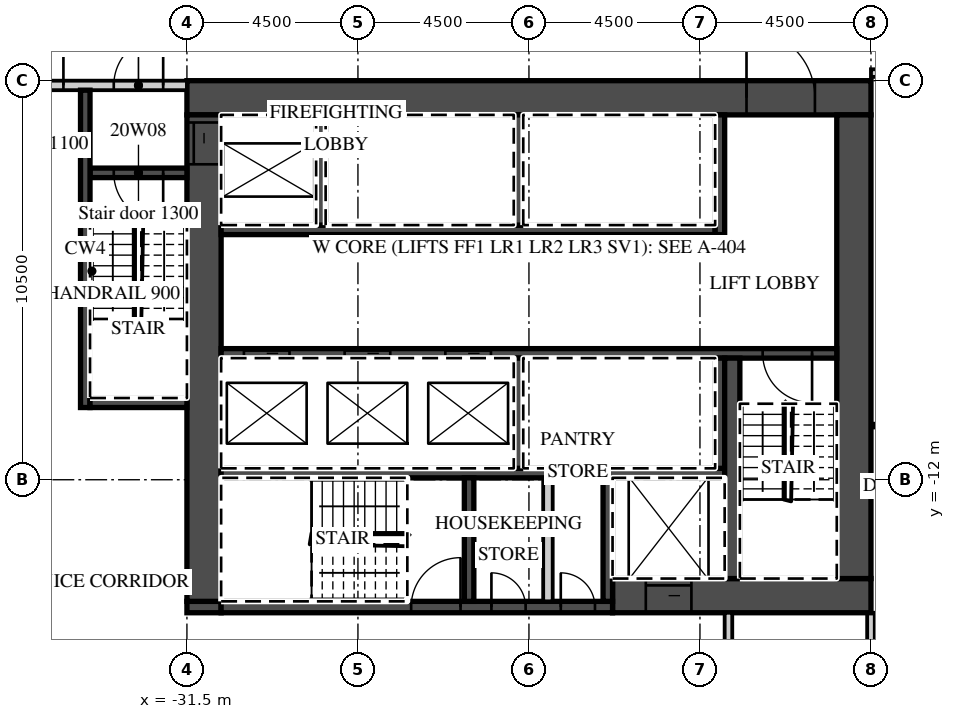
"""IFC4 building model, lengths in metres.
Left out: names, types, materials, properties, quantities, classifications, styles, units other than length and angle.
Written with IfcOpenShell. Run it as: python <this file> out.ifc"""

import sys

from ifc_helpers import new_model, si_unit, direction, frame, frame_2d, origin, place, context, subcontext, project, spatial, rectangle, extrude, element, fill, save


model = new_model("IFC4")
c1 = context("Model", 3, precision=1e-05, world=origin(), true_north=direction((0.0, 1.0)))
c2 = subcontext(c1, "Body", "Model", "MODEL_VIEW")
j1 = project(units=[si_unit("LENGTHUNIT", "METRE"), si_unit("PLANEANGLEUNIT", "RADIAN")], contexts=[c1])
p1 = place(None, origin())
s1 = spatial("IfcSite", under=j1, at=p1, CompositionType="ELEMENT")
p2 = place(p1, origin())
s2 = spatial("IfcBuilding", under=s1, at=p2, CompositionType="ELEMENT")
p3 = place(p2, frame((0.0, 0.0, 96.3)))
s3 = spatial("IfcBuildingStorey", under=s2, at=p3, CompositionType="ELEMENT", Elevation=96.3)
p4 = place(p3, frame((-13.5, -21.55, 0.0), z_axis=(0.0, 0.0, 1.0), x_axis=(0.0, 1.0, 0.0)))
e1 = element("IfcWall", 1, at=p4, inside=s3, PredefinedType="PARTITIONING", context=c2, shape_type="SweptSolid", body=[
    extrude(rectangle(XDim=6.05, YDim=0.2, at=frame_2d((3.025, 0.0))), origin(), (0.0, 0.0, 1.0), 3.0),
])
p5 = place(p3, frame((-13.5, -1.3, 0.0), z_axis=(0.0, 0.0, 1.0), x_axis=(1.0, 0.0, 0.0)))
e2 = element("IfcWall", 2, at=p5, inside=s3, PredefinedType="PARTITIONING", context=c2, shape_type="SweptSolid", body=[
    extrude(rectangle(XDim=58.05, YDim=0.2, at=frame_2d((29.025, 0.0))), origin(), (0.0, 0.0, 1.0), 3.0),
])
p6 = place(p5, frame((0.575, 0.0, 0.0)))
e3 = element("IfcOpeningElement", 3, at=p6, cuts=e2, PredefinedType="OPENING", context=c2, shape_type="SweptSolid", body=[
    extrude(rectangle(XDim=1.0, YDim=2.1, at=frame_2d((0.5, 1.05))), frame((0.0, 0.11, 0.0), z_axis=(0.0, -1.0, 0.0), x_axis=(1.0, 0.0, 0.0)), (0.0, 0.0, 1.0), 0.22),
])
p7 = place(p5, frame((7.45, 0.0, 0.0)))
e4 = element("IfcOpeningElement", 4, at=p7, cuts=e2, PredefinedType="OPENING", context=c2, shape_type="SweptSolid", body=[
    extrude(rectangle(XDim=1.0, YDim=2.1, at=frame_2d((0.5, 1.05))), frame((0.0, 0.11, 0.0), z_axis=(0.0, -1.0, 0.0), x_axis=(1.0, 0.0, 0.0)), (0.0, 0.0, 1.0), 0.22),
])
p8 = place(p5, frame((11.925, 0.0, 0.0)))
e5 = element("IfcOpeningElement", 5, at=p8, cuts=e2, PredefinedType="OPENING", context=c2, shape_type="SweptSolid", body=[
    extrude(rectangle(XDim=1.0, YDim=2.1, at=frame_2d((0.5, 1.05))), frame((0.0, 0.11, 0.0), z_axis=(0.0, -1.0, 0.0), x_axis=(1.0, 0.0, 0.0)), (0.0, 0.0, 1.0), 0.22),
])
p9 = place(p5, frame((14.075, 0.0, 0.0)))
e6 = element("IfcOpeningElement", 6, at=p9, cuts=e2, PredefinedType="OPENING", context=c2, shape_type="SweptSolid", body=[
    extrude(rectangle(XDim=1.0, YDim=2.1, at=frame_2d((0.5, 1.05))), frame((0.0, 0.11, 0.0), z_axis=(0.0, -1.0, 0.0), x_axis=(1.0, 0.0, 0.0)), (0.0, 0.0, 1.0), 0.22),
])
p10 = place(p5, frame((20.925, 0.0, 0.0)))
e7 = element("IfcOpeningElement", 7, at=p10, cuts=e2, PredefinedType="OPENING", context=c2, shape_type="SweptSolid", body=[
    extrude(rectangle(XDim=1.0, YDim=2.1, at=frame_2d((0.5, 1.05))), frame((0.0, 0.11, 0.0), z_axis=(0.0, -1.0, 0.0), x_axis=(1.0, 0.0, 0.0)), (0.0, 0.0, 1.0), 0.22),
])
p11 = place(p5, frame((27.862, 0.0, 0.0)))
e8 = element("IfcOpeningElement", 8, at=p11, cuts=e2, PredefinedType="OPENING", context=c2, shape_type="SweptSolid", body=[
    extrude(rectangle(XDim=1.2, YDim=2.1, at=frame_2d((0.6, 1.05))), frame((0.0, 0.11, 0.0), z_axis=(0.0, -1.0, 0.0), x_axis=(1.0, 0.0, 0.0)), (0.0, 0.0, 1.0), 0.22),
])
p12 = place(p5, frame((33.938, 0.0, 0.0)))
e9 = element("IfcOpeningElement", 9, at=p12, cuts=e2, PredefinedType="OPENING", context=c2, shape_type="SweptSolid", body=[
    extrude(rectangle(XDim=1.2, YDim=2.1, at=frame_2d((0.6, 1.05))), frame((0.0, 0.11, 0.0), z_axis=(0.0, -1.0, 0.0), x_axis=(1.0, 0.0, 0.0)), (0.0, 0.0, 1.0), 0.22),
])
p13 = place(p5, frame((45.862, 0.0, 0.0)))
e10 = element("IfcOpeningElement", 10, at=p13, cuts=e2, PredefinedType="OPENING", context=c2, shape_type="SweptSolid", body=[
    extrude(rectangle(XDim=1.2, YDim=2.1, at=frame_2d((0.6, 1.05))), frame((0.0, 0.11, 0.0), z_axis=(0.0, -1.0, 0.0), x_axis=(1.0, 0.0, 0.0)), (0.0, 0.0, 1.0), 0.22),
])
p14 = place(p5, frame((52.425, 0.0, 0.0)))
e11 = element("IfcOpeningElement", 11, at=p14, cuts=e2, PredefinedType="OPENING", context=c2, shape_type="SweptSolid", body=[
    extrude(rectangle(XDim=1.0, YDim=2.1, at=frame_2d((0.5, 1.05))), frame((0.0, 0.11, 0.0), z_axis=(0.0, -1.0, 0.0), x_axis=(1.0, 0.0, 0.0)), (0.0, 0.0, 1.0), 0.22),
])
p15 = place(p5, frame((56.525, 0.0, 0.0)))
e12 = element("IfcOpeningElement", 12, at=p15, cuts=e2, PredefinedType="OPENING", context=c2, shape_type="SweptSolid", body=[
    extrude(rectangle(XDim=1.0, YDim=2.1, at=frame_2d((0.5, 1.05))), frame((0.0, 0.11, 0.0), z_axis=(0.0, -1.0, 0.0), x_axis=(1.0, 0.0, 0.0)), (0.0, 0.0, 1.0), 0.22),
])
p16 = place(p3, frame((-31.5, -1.95, 0.0), z_axis=(0.0, 0.0, 1.0), x_axis=(1.0, 0.0, 0.0)))
e13 = element("IfcWall", 13, at=p16, inside=s3, PredefinedType="SHEAR", context=c2, shape_type="SweptSolid", body=[
    extrude(rectangle(XDim=18.0, YDim=0.9, at=frame_2d((9.0, 0.0))), origin(), (0.0, 0.0, 1.0), 3.0),
])
p17 = place(p16, frame((14.725, 0.0, 0.0)))
e14 = element("IfcOpeningElement", 14, at=p17, cuts=e13, PredefinedType="OPENING", context=c2, shape_type="SweptSolid", body=[
    extrude(rectangle(XDim=1.8, YDim=2.1, at=frame_2d((0.9, 1.05))), frame((0.0, 0.46, 0.0), z_axis=(0.0, -1.0, 0.0), x_axis=(1.0, 0.0, 0.0)), (0.0, 0.0, 1.0), 0.92),
])
p18 = place(p3, frame((-20.3, -15.05, 0.0), z_axis=(0.0, 0.0, 1.0), x_axis=(1.0, 0.0, 0.0)))
e15 = element("IfcWall", 15, at=p18, inside=s3, PredefinedType="SHEAR", context=c2, shape_type="SweptSolid", body=[
    extrude(rectangle(XDim=6.8, YDim=0.9, at=frame_2d((3.4, 0.0))), origin(), (0.0, 0.0, 1.0), 3.0),
])
p19 = place(p18, frame((0.875, 0.0, 0.0)))
e16 = element("IfcOpeningElement", 16, at=p19, cuts=e15, PredefinedType="OPENING", context=c2, shape_type="SweptSolid", body=[
    extrude(rectangle(XDim=1.2, YDim=2.1, at=frame_2d((0.6, 1.05))), frame((0.0, 0.46, 0.0), z_axis=(0.0, -1.0, 0.0), x_axis=(1.0, 0.0, 0.0)), (0.0, 0.0, 1.0), 0.92),
])
p20 = place(p3, frame((-31.5, -15.35, 0.0), z_axis=(0.0, 0.0, 1.0), x_axis=(1.0, 0.0, 0.0)))
e17 = element("IfcWall", 17, at=p20, inside=s3, PredefinedType="SHEAR", context=c2, shape_type="SweptSolid", body=[
    extrude(rectangle(XDim=0.9, YDim=0.3, at=frame_2d((0.45, 0.0))), origin(), (0.0, 0.0, 1.0), 3.0),
])
p21 = place(p3, frame((-30.6, -15.35, 0.0), z_axis=(0.0, 0.0, 1.0), x_axis=(1.0, 0.0, 0.0)))
e18 = element("IfcWall", 18, at=p21, inside=s3, PredefinedType="SHEAR", context=c2, shape_type="SweptSolid", body=[
    extrude(rectangle(XDim=10.3, YDim=0.3, at=frame_2d((5.15, 0.0))), origin(), (0.0, 0.0, 1.0), 3.0),
])
p22 = place(p21, frame((5.0, 0.0, 0.0)))
e19 = element("IfcOpeningElement", 19, at=p22, cuts=e18, PredefinedType="OPENING", context=c2, shape_type="SweptSolid", body=[
    extrude(rectangle(XDim=1.3, YDim=2.1, at=frame_2d((0.65, 1.05))), frame((0.0, 0.16, 0.0), z_axis=(0.0, -1.0, 0.0), x_axis=(1.0, 0.0, 0.0)), (0.0, 0.0, 1.0), 0.32),
])
p23 = place(p21, frame((7.113, 0.0, 0.0)))
e20 = element("IfcOpeningElement", 20, at=p23, cuts=e18, PredefinedType="OPENING", context=c2, shape_type="SweptSolid", body=[
    extrude(rectangle(XDim=0.9, YDim=2.1, at=frame_2d((0.45, 1.05))), frame((0.0, 0.16, 0.0), z_axis=(0.0, -1.0, 0.0), x_axis=(1.0, 0.0, 0.0)), (0.0, 0.0, 1.0), 0.32),
])
p24 = place(p21, frame((8.938, 0.0, 0.0)))
e21 = element("IfcOpeningElement", 21, at=p24, cuts=e18, PredefinedType="OPENING", context=c2, shape_type="SweptSolid", body=[
    extrude(rectangle(XDim=0.9, YDim=2.1, at=frame_2d((0.45, 1.05))), frame((0.0, 0.16, 0.0), z_axis=(0.0, -1.0, 0.0), x_axis=(1.0, 0.0, 0.0)), (0.0, 0.0, 1.0), 0.32),
])
p25 = place(p3, frame((-31.05, -15.2, 0.0), z_axis=(0.0, 0.0, 1.0), x_axis=(0.0, 1.0, 0.0)))
e22 = element("IfcWall", 22, at=p25, inside=s3, PredefinedType="SHEAR", context=c2, shape_type="SweptSolid", body=[
    extrude(rectangle(XDim=12.8, YDim=0.9, at=frame_2d((6.4, 0.0))), origin(), (0.0, 0.0, 1.0), 3.0),
])
p26 = place(p25, frame((11.5, 0.0, 0.0)))
e23 = element("IfcOpeningElement", 23, at=p26, cuts=e22, PredefinedType="OPENING", context=c2, shape_type="SweptSolid", body=[
    extrude(rectangle(XDim=1.1, YDim=2.1, at=frame_2d((0.55, 1.05))), frame((0.0, 0.46, 0.0), z_axis=(0.0, -1.0, 0.0), x_axis=(1.0, 0.0, 0.0)), (0.0, 0.0, 1.0), 0.92),
])
p27 = place(p3, frame((-13.95, -14.6, 0.0), z_axis=(0.0, 0.0, 1.0), x_axis=(0.0, 1.0, 0.0)))
e24 = element("IfcWall", 24, at=p27, inside=s3, PredefinedType="SHEAR", context=c2, shape_type="SweptSolid", body=[
    extrude(rectangle(XDim=12.2, YDim=0.9, at=frame_2d((6.1, 0.0))), origin(), (0.0, 0.0, 1.0), 3.0),
])
p28 = place(p3, frame((-30.6, -5.425, 0.0), z_axis=(0.0, 0.0, 1.0), x_axis=(1.0, 0.0, 0.0)))
e25 = element("IfcWall", 25, at=p28, inside=s3, PredefinedType="SHEAR", context=c2, shape_type="SweptSolid", body=[
    extrude(rectangle(XDim=13.0, YDim=0.25, at=frame_2d((6.5, 0.0))), origin(), (0.0, 0.0, 1.0), 3.0),
])
p29 = place(p3, frame((-17.475, -5.55, 0.0), z_axis=(0.0, 0.0, 1.0), x_axis=(0.0, 1.0, 0.0)))
e26 = element("IfcWall", 26, at=p29, inside=s3, PredefinedType="SHEAR", context=c2, shape_type="SweptSolid", body=[
    extrude(rectangle(XDim=3.15, YDim=0.25, at=frame_2d((1.575, 0.0))), origin(), (0.0, 0.0, 1.0), 3.0),
])
for number, where, z_axis, x_axis in (
    (27, (-27.975, -5.3, 0.0), (0.0, 0.0, 1.0), (0.0, 1.0, 0.0)),
    (28, (-22.775, -5.3, 0.0), (0.0, 0.0, 1.0), (0.0, 1.0, 0.0)),
):
    element("IfcWall", number, at=place(p3, frame(where, z_axis=z_axis, x_axis=x_axis)), inside=s3, PredefinedType="SHEAR", context=c2, shape_type="SweptSolid", body=[
        extrude(rectangle(XDim=2.9, YDim=0.25, at=frame_2d((1.45, 0.0))), origin(), (0.0, 0.0, 1.0), 3.0),
    ])
p30 = place(p3, frame((-30.6, -8.675, 0.0), z_axis=(0.0, 0.0, 1.0), x_axis=(1.0, 0.0, 0.0)))
e29 = element("IfcWall", 29, at=p30, inside=s3, PredefinedType="SHEAR", context=c2, shape_type="SweptSolid", body=[
    extrude(rectangle(XDim=16.2, YDim=0.25, at=frame_2d((8.1, 0.0))), origin(), (0.0, 0.0, 1.0), 3.0),
])
p31 = place(p30, frame((0.6, 0.0, 0.0)))
e30 = element("IfcOpeningElement", 30, at=p31, cuts=e29, PredefinedType="OPENING", context=c2, shape_type="SweptSolid", body=[
    extrude(rectangle(XDim=1.2, YDim=2.1, at=frame_2d((0.6, 1.05))), frame((0.0, 0.135, 0.0), z_axis=(0.0, -1.0, 0.0), x_axis=(1.0, 0.0, 0.0)), (0.0, 0.0, 1.0), 0.27),
])
p32 = place(p30, frame((3.25, 0.0, 0.0)))
e31 = element("IfcOpeningElement", 31, at=p32, cuts=e29, PredefinedType="OPENING", context=c2, shape_type="SweptSolid", body=[
    extrude(rectangle(XDim=1.2, YDim=2.1, at=frame_2d((0.6, 1.05))), frame((0.0, 0.135, 0.0), z_axis=(0.0, -1.0, 0.0), x_axis=(1.0, 0.0, 0.0)), (0.0, 0.0, 1.0), 0.27),
])
p33 = place(p30, frame((5.9, 0.0, 0.0)))
e32 = element("IfcOpeningElement", 32, at=p33, cuts=e29, PredefinedType="OPENING", context=c2, shape_type="SweptSolid", body=[
    extrude(rectangle(XDim=1.2, YDim=2.1, at=frame_2d((0.6, 1.05))), frame((0.0, 0.135, 0.0), z_axis=(0.0, -1.0, 0.0), x_axis=(1.0, 0.0, 0.0)), (0.0, 0.0, 1.0), 0.27),
])
p34 = place(p30, frame((14.25, 0.0, 0.0)))
e33 = element("IfcOpeningElement", 33, at=p34, cuts=e29, PredefinedType="OPENING", context=c2, shape_type="SweptSolid", body=[
    extrude(rectangle(XDim=1.3, YDim=2.1, at=frame_2d((0.65, 1.05))), frame((0.0, 0.135, 0.0), z_axis=(0.0, -1.0, 0.0), x_axis=(1.0, 0.0, 0.0)), (0.0, 0.0, 1.0), 0.27),
])
p35 = place(p3, frame((-30.6, -11.825, 0.0), z_axis=(0.0, 0.0, 1.0), x_axis=(1.0, 0.0, 0.0)))
e34 = element("IfcWall", 34, at=p35, inside=s3, PredefinedType="SHEAR", context=c2, shape_type="SweptSolid", body=[
    extrude(rectangle(XDim=13.25, YDim=0.25, at=frame_2d((6.625, 0.0))), origin(), (0.0, 0.0, 1.0), 3.0),
])
for number, where, z_axis, x_axis in (
    (35, (-17.475, -11.7, 0.0), (0.0, 0.0, 1.0), (0.0, 1.0, 0.0)),
    (36, (-22.775, -11.7, 0.0), (0.0, 0.0, 1.0), (0.0, 1.0, 0.0)),
):
    element("IfcWall", number, at=place(p3, frame(where, z_axis=z_axis, x_axis=x_axis)), inside=s3, PredefinedType="SHEAR", context=c2, shape_type="SweptSolid", body=[
        extrude(rectangle(XDim=2.9, YDim=0.25, at=frame_2d((1.45, 0.0))), origin(), (0.0, 0.0, 1.0), 3.0),
    ])
p36 = place(p3, frame((-17.15, -14.6, 0.0), z_axis=(0.0, 0.0, 1.0), x_axis=(0.0, 1.0, 0.0)))
e37 = element("IfcWall", 37, at=p36, inside=s3, PredefinedType="SHEAR", context=c2, shape_type="SweptSolid", body=[
    extrude(rectangle(XDim=5.8, YDim=0.4, at=frame_2d((2.9, 0.0))), origin(), (0.0, 0.0, 1.0), 3.0),
])
for number, where, z_axis, x_axis in (
    (38, (-20.425, -15.2, 0.0), (0.0, 0.0, 1.0), (0.0, 1.0, 0.0)),
    (39, (-24.075, -15.2, 0.0), (0.0, 0.0, 1.0), (0.0, 1.0, 0.0)),
):
    element("IfcWall", number, at=place(p3, frame(where, z_axis=z_axis, x_axis=x_axis)), inside=s3, PredefinedType="SHEAR", context=c2, shape_type="SweptSolid", body=[
        extrude(rectangle(XDim=3.25, YDim=0.25, at=frame_2d((1.625, 0.0))), origin(), (0.0, 0.0, 1.0), 3.0),
    ])
p37 = place(p3, frame((-22.0, -15.2, 0.0), z_axis=(0.0, 0.0, 1.0), x_axis=(0.0, 1.0, 0.0)))
e40 = element("IfcWall", 40, at=p37, inside=s3, PredefinedType="PARTITIONING", context=c2, shape_type="SweptSolid", body=[
    extrude(rectangle(XDim=3.25, YDim=0.25, at=frame_2d((1.625, 0.0))), origin(), (0.0, 0.0, 1.0), 3.0),
])
p38 = place(p3, frame((-44.55, -1.625, 0.0), z_axis=(0.0, 0.0, 1.0), x_axis=(1.0, 0.0, 0.0)))
e41 = element("IfcWall", 41, at=p38, inside=s3, PredefinedType="PARTITIONING", context=c2, shape_type="SweptSolid", body=[
    extrude(rectangle(XDim=13.05, YDim=0.25, at=frame_2d((6.525, 0.0))), origin(), (0.0, 0.0, 1.0), 3.0),
])
p39 = place(p38, frame((11.125, 0.0, 0.0)))
e42 = element("IfcOpeningElement", 42, at=p39, cuts=e41, PredefinedType="OPENING", context=c2, shape_type="SweptSolid", body=[
    extrude(rectangle(XDim=1.3, YDim=2.1, at=frame_2d((0.65, 1.05))), frame((0.0, 0.135, 0.0), z_axis=(0.0, -1.0, 0.0), x_axis=(1.0, 0.0, 0.0)), (0.0, 0.0, 1.0), 0.27),
])
p40 = place(p38, frame((8.7, 0.0, 0.0)))
e43 = element("IfcOpeningElement", 43, at=p40, cuts=e41, PredefinedType="OPENING", context=c2, shape_type="SweptSolid", body=[
    extrude(rectangle(XDim=1.1, YDim=2.1, at=frame_2d((0.55, 1.05))), frame((0.0, 0.135, 0.0), z_axis=(0.0, -1.0, 0.0), x_axis=(1.0, 0.0, 0.0)), (0.0, 0.0, 1.0), 0.27),
])
p41 = place(p3, frame((-34.05, -3.925, 0.0), z_axis=(0.0, 0.0, 1.0), x_axis=(1.0, 0.0, 0.0)))
e44 = element("IfcWall", 44, at=p41, inside=s3, PredefinedType="SHEAR", context=c2, shape_type="SweptSolid", body=[
    extrude(rectangle(XDim=2.55, YDim=0.25, at=frame_2d((1.275, 0.0))), origin(), (0.0, 0.0, 1.0), 3.0),
])
p42 = place(p41, frame((0.625, 0.0, 0.0)))
e45 = element("IfcOpeningElement", 45, at=p42, cuts=e44, PredefinedType="OPENING", context=c2, shape_type="SweptSolid", body=[
    extrude(rectangle(XDim=1.3, YDim=2.1, at=frame_2d((0.65, 1.05))), frame((0.0, 0.135, 0.0), z_axis=(0.0, -1.0, 0.0), x_axis=(1.0, 0.0, 0.0)), (0.0, 0.0, 1.0), 0.27),
])
p43 = place(p3, frame((-34.175, -10.1, 0.0), z_axis=(0.0, 0.0, 1.0), x_axis=(0.0, 1.0, 0.0)))
e46 = element("IfcWall", 46, at=p43, inside=s3, PredefinedType="SHEAR", context=c2, shape_type="SweptSolid", body=[
    extrude(rectangle(XDim=8.35, YDim=0.25, at=frame_2d((4.175, 0.0))), origin(), (0.0, 0.0, 1.0), 3.0),
])
p44 = place(p3, frame((-34.05, -9.975, 0.0), z_axis=(0.0, 0.0, 1.0), x_axis=(1.0, 0.0, 0.0)))
e47 = element("IfcWall", 47, at=p44, inside=s3, PredefinedType="SHEAR", context=c2, shape_type="SweptSolid", body=[
    extrude(rectangle(XDim=2.55, YDim=0.25, at=frame_2d((1.275, 0.0))), origin(), (0.0, 0.0, 1.0), 3.0),
])
p45 = place(p3, frame((-17.25, -17.7, 0.0), z_axis=(0.0, 0.0, 1.0), x_axis=(0.0, 1.0, 0.0)))
e48 = element("IfcWall", 48, at=p45, inside=s3, PredefinedType="PARTITIONING", context=c2, shape_type="SweptSolid", body=[
    extrude(rectangle(XDim=2.2, YDim=0.2, at=frame_2d((1.1, 0.0))), origin(), (0.0, 0.0, 1.0), 3.0),
])
p46 = place(p31, origin())
e49 = element("IfcDoor", 49, at=p46, inside=s3, OperationType="SLIDING_TO_LEFT", PredefinedType="DOOR", context=c2, shape_type="SweptSolid", body=[
    extrude(rectangle(XDim=1.2, YDim=2.1, at=frame_2d((0.6, 1.05))), frame((0.0, 0.025, 0.0), z_axis=(0.0, -1.0, 0.0), x_axis=(1.0, 0.0, 0.0)), (0.0, 0.0, 1.0), 0.05),
])
fill(e30, e49)
p47 = place(p32, origin())
e50 = element("IfcDoor", 50, at=p47, inside=s3, OperationType="SLIDING_TO_RIGHT", PredefinedType="DOOR", context=c2, shape_type="SweptSolid", body=[
    extrude(rectangle(XDim=1.2, YDim=2.1, at=frame_2d((0.6, 1.05))), frame((0.0, 0.025, 0.0), z_axis=(0.0, -1.0, 0.0), x_axis=(1.0, 0.0, 0.0)), (0.0, 0.0, 1.0), 0.05),
])
fill(e31, e50)
p48 = place(p33, origin())
e51 = element("IfcDoor", 51, at=p48, inside=s3, OperationType="SLIDING_TO_RIGHT", PredefinedType="DOOR", context=c2, shape_type="SweptSolid", body=[
    extrude(rectangle(XDim=1.2, YDim=2.1, at=frame_2d((0.6, 1.05))), frame((0.0, 0.025, 0.0), z_axis=(0.0, -1.0, 0.0), x_axis=(1.0, 0.0, 0.0)), (0.0, 0.0, 1.0), 0.05),
])
fill(e32, e51)
p49 = place(p19, origin())
e52 = element("IfcDoor", 52, at=p49, inside=s3, OperationType="SLIDING_TO_LEFT", PredefinedType="DOOR", context=c2, shape_type="SweptSolid", body=[
    extrude(rectangle(XDim=1.2, YDim=2.1, at=frame_2d((0.6, 1.05))), frame((0.0, 0.025, 0.0), z_axis=(0.0, -1.0, 0.0), x_axis=(1.0, 0.0, 0.0)), (0.0, 0.0, 1.0), 0.05),
])
fill(e16, e52)
p50 = place(p26, origin())
e53 = element("IfcDoor", 53, at=p50, inside=s3, OperationType="SLIDING_TO_RIGHT", PredefinedType="DOOR", context=c2, shape_type="SweptSolid", body=[
    extrude(rectangle(XDim=1.1, YDim=2.1, at=frame_2d((0.55, 1.05))), frame((0.0, 0.025, 0.0), z_axis=(0.0, -1.0, 0.0), x_axis=(1.0, 0.0, 0.0)), (0.0, 0.0, 1.0), 0.05),
])
fill(e23, e53)
p51 = place(p17, origin())
e54 = element("IfcDoor", 54, at=p51, inside=s3, OperationType="DOUBLE_DOOR_DOUBLE_SWING", PredefinedType="DOOR", context=c2, shape_type="SweptSolid", body=[
    extrude(rectangle(XDim=1.8, YDim=2.1, at=frame_2d((0.9, 1.05))), frame((0.0, 0.025, 0.0), z_axis=(0.0, -1.0, 0.0), x_axis=(1.0, 0.0, 0.0)), (0.0, 0.0, 1.0), 0.05),
])
fill(e14, e54)
p52 = place(p39, origin())
e55 = element("IfcDoor", 55, at=p52, inside=s3, OperationType="SINGLE_SWING_RIGHT", PredefinedType="DOOR", context=c2, shape_type="SweptSolid", body=[
    extrude(rectangle(XDim=1.3, YDim=2.1, at=frame_2d((0.65, 1.05))), frame((0.0, 0.025, 0.0), z_axis=(0.0, -1.0, 0.0), x_axis=(1.0, 0.0, 0.0)), (0.0, 0.0, 1.0), 0.05),
])
fill(e42, e55)
p53 = place(p42, origin())
e56 = element("IfcDoor", 56, at=p53, inside=s3, OperationType="SINGLE_SWING_RIGHT", PredefinedType="DOOR", context=c2, shape_type="SweptSolid", body=[
    extrude(rectangle(XDim=1.3, YDim=2.1, at=frame_2d((0.65, 1.05))), frame((0.0, 0.025, 0.0), z_axis=(0.0, -1.0, 0.0), x_axis=(1.0, 0.0, 0.0)), (0.0, 0.0, 1.0), 0.05),
])
fill(e45, e56)
p54 = place(p40, origin())
e57 = element("IfcDoor", 57, at=p54, inside=s3, OperationType="SINGLE_SWING_RIGHT", PredefinedType="DOOR", context=c2, shape_type="SweptSolid", body=[
    extrude(rectangle(XDim=1.1, YDim=2.1, at=frame_2d((0.55, 1.05))), frame((0.0, 0.025, 0.0), z_axis=(0.0, -1.0, 0.0), x_axis=(1.0, 0.0, 0.0)), (0.0, 0.0, 1.0), 0.05),
])
fill(e43, e57)
p55 = place(p34, origin())
e58 = element("IfcDoor", 58, at=p55, inside=s3, OperationType="SINGLE_SWING_RIGHT", PredefinedType="DOOR", context=c2, shape_type="SweptSolid", body=[
    extrude(rectangle(XDim=1.3, YDim=2.1, at=frame_2d((0.65, 1.05))), frame((0.0, 0.025, 0.0), z_axis=(0.0, -1.0, 0.0), x_axis=(1.0, 0.0, 0.0)), (0.0, 0.0, 1.0), 0.05),
])
fill(e33, e58)
p56 = place(p22, origin())
e59 = element("IfcDoor", 59, at=p56, inside=s3, OperationType="SINGLE_SWING_RIGHT", PredefinedType="DOOR", context=c2, shape_type="SweptSolid", body=[
    extrude(rectangle(XDim=1.3, YDim=2.1, at=frame_2d((0.65, 1.05))), frame((0.0, 0.025, 0.0), z_axis=(0.0, -1.0, 0.0), x_axis=(1.0, 0.0, 0.0)), (0.0, 0.0, 1.0), 0.05),
])
fill(e19, e59)
p57 = place(p23, origin())
e60 = element("IfcDoor", 60, at=p57, inside=s3, OperationType="SINGLE_SWING_LEFT", PredefinedType="DOOR", context=c2, shape_type="SweptSolid", body=[
    extrude(rectangle(XDim=0.9, YDim=2.1, at=frame_2d((0.45, 1.05))), frame((0.0, 0.025, 0.0), z_axis=(0.0, -1.0, 0.0), x_axis=(1.0, 0.0, 0.0)), (0.0, 0.0, 1.0), 0.05),
])
fill(e20, e60)
p58 = place(p24, origin())
e61 = element("IfcDoor", 61, at=p58, inside=s3, OperationType="SINGLE_SWING_LEFT", PredefinedType="DOOR", context=c2, shape_type="SweptSolid", body=[
    extrude(rectangle(XDim=0.9, YDim=2.1, at=frame_2d((0.45, 1.05))), frame((0.0, 0.025, 0.0), z_axis=(0.0, -1.0, 0.0), x_axis=(1.0, 0.0, 0.0)), (0.0, 0.0, 1.0), 0.05),
])
fill(e21, e61)
save(model, sys.argv[1])
